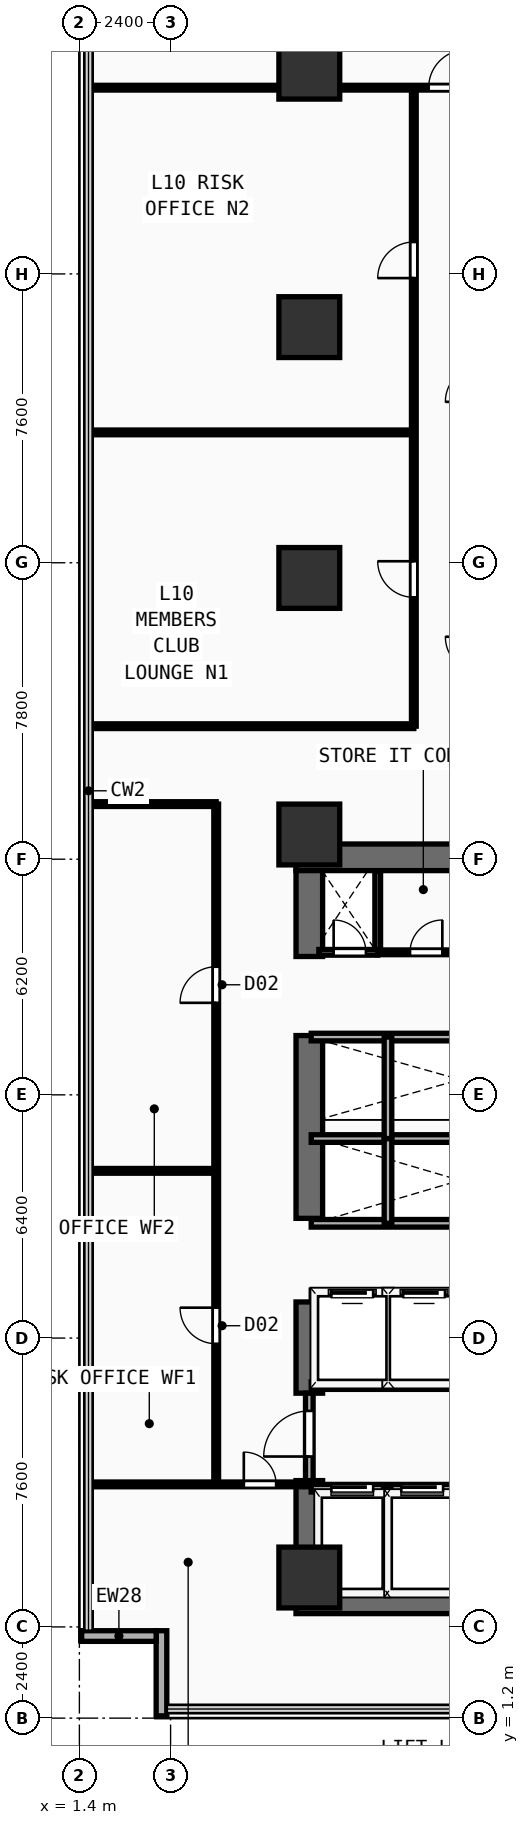
"""IFC4 building model, lengths in metres.
Left out: names, types, materials, properties, quantities, classifications, styles, units other than length and angle.
Written with IfcOpenShell. Run it as: python <this file> out.ifc"""

import sys

from ifc_helpers import new_model, si_unit, direction, frame, frame_2d, origin, origin_2d, place, context, subcontext, project, spatial, rectangle, extrude, element, fill, save


model = new_model("IFC4")
c1 = context("Model", 3, precision=1e-05, world=origin(), true_north=direction((0.0, 1.0)))
c2 = subcontext(c1, "Body", "Model", "MODEL_VIEW")
j1 = project(units=[si_unit("LENGTHUNIT", "METRE"), si_unit("PLANEANGLEUNIT", "RADIAN")], contexts=[c1])
p1 = place(None, origin())
s1 = spatial("IfcSite", under=j1, at=p1, CompositionType="ELEMENT")
p2 = place(p1, origin())
s2 = spatial("IfcBuilding", under=s1, at=p2, CompositionType="ELEMENT")
p3 = place(p2, frame((0.0, 0.0, 41.0)))
s3 = spatial("IfcBuildingStorey", under=s2, at=p3, CompositionType="ELEMENT", Elevation=41.0)
for number, where, z_axis, x_axis in (
    (1, (7.1, 4.3, 0.0), (0.0, 0.0, 1.0), (1.0, 0.0, 0.0)),
    (2, (7.1, 23.85, 0.0), (0.0, 0.0, 1.0), (1.0, 0.0, 0.0)),
):
    element("IfcWall", number, at=place(p3, frame(where, z_axis=z_axis, x_axis=x_axis)), inside=s3, PredefinedType="SHEAR", context=c2, shape_type="SweptSolid", body=[
        extrude(rectangle(XDim=14.05, YDim=0.7, at=frame_2d((7.025, 0.0))), origin(), (0.0, 0.0, 1.0), 3.54),
    ])
p4 = place(p3, frame((7.45, 4.65, 0.0), z_axis=(0.0, 0.0, 1.0), x_axis=(0.0, 1.0, 0.0)))
e3 = element("IfcWall", 3, at=p4, inside=s3, PredefinedType="SHEAR", context=c2, shape_type="SweptSolid", body=[
    extrude(rectangle(XDim=2.8, YDim=0.7, at=frame_2d((1.4, 0.0))), origin(), (0.0, 0.0, 1.0), 3.54),
])
p5 = place(p3, frame((7.45, 9.75, 0.0), z_axis=(0.0, 0.0, 1.0), x_axis=(0.0, 1.0, 0.0)))
e4 = element("IfcWall", 4, at=p5, inside=s3, PredefinedType="SHEAR", context=c2, shape_type="SweptSolid", body=[
    extrude(rectangle(XDim=2.4, YDim=0.7, at=frame_2d((1.2, 0.0))), origin(), (0.0, 0.0, 1.0), 3.54),
])
p6 = place(p3, frame((7.45, 14.35, 0.0), z_axis=(0.0, 0.0, 1.0), x_axis=(0.0, 1.0, 0.0)))
e5 = element("IfcWall", 5, at=p6, inside=s3, PredefinedType="SHEAR", context=c2, shape_type="SweptSolid", body=[
    extrude(rectangle(XDim=4.81, YDim=0.7, at=frame_2d((2.405, 0.0))), origin(), (0.0, 0.0, 1.0), 3.54),
])
p7 = place(p3, frame((7.45, 21.24, 0.0), z_axis=(0.0, 0.0, 1.0), x_axis=(0.0, 1.0, 0.0)))
e6 = element("IfcWall", 6, at=p7, inside=s3, PredefinedType="SHEAR", context=c2, shape_type="SweptSolid", body=[
    extrude(rectangle(XDim=2.26, YDim=0.7, at=frame_2d((1.13, 0.0))), origin(), (0.0, 0.0, 1.0), 3.54),
])
for number, where, z_axis, x_axis in (
    (7, (7.45, 4.9, 0.0), (0.0, 0.0, 1.0), (1.0, 0.0, 0.0)),
    (8, (7.45, 24.45, 0.0), (0.0, 0.0, 1.0), (1.0, 0.0, 0.0)),
    (9, (7.45, 31.2, 0.0), (0.0, 0.0, 1.0), (1.0, 0.0, 0.0)),
    (10, (7.45, 37.8, 0.0), (0.0, 0.0, 1.0), (1.0, 0.0, 0.0)),
    (11, (7.45, 44.6, 0.0), (0.0, 0.0, 1.0), (1.0, 0.0, 0.0)),
):
    element("IfcColumn", number, at=place(p3, frame(where, z_axis=z_axis, x_axis=x_axis)), inside=s3, PredefinedType="COLUMN", context=c2, shape_type="SweptSolid", body=[
        extrude(rectangle(XDim=1.6, YDim=1.6, at=origin_2d()), origin(), (0.0, 0.0, 1.0), 3.54),
    ])
p8 = place(p3, frame((3.56, 1.26, 0.0), z_axis=(0.0, 0.0, 1.0), x_axis=(0.0, 1.0, 0.0)))
e12 = element("IfcWall", 12, at=p8, inside=s3, PredefinedType="SOLIDWALL", context=c2, shape_type="SweptSolid", body=[
    extrude(rectangle(XDim=2.24, YDim=0.28, at=frame_2d((1.12, 0.0))), origin(), (0.0, 0.0, 1.0), 3.54),
])
p9 = place(p3, frame((1.46, 3.36, 0.0), z_axis=(0.0, 0.0, 1.0), x_axis=(1.0, 0.0, 0.0)))
e13 = element("IfcWall", 13, at=p9, inside=s3, PredefinedType="SOLIDWALL", context=c2, shape_type="SweptSolid", body=[
    extrude(rectangle(XDim=1.96, YDim=0.28, at=frame_2d((0.98, 0.0))), origin(), (0.0, 0.0, 1.0), 3.54),
])
p10 = place(p3, frame((7.5, 7.25, 0.0), z_axis=(0.0, 0.0, 1.0), x_axis=(1.0, 0.0, 0.0)))
e14 = element("IfcWall", 14, at=p10, inside=s3, PredefinedType="PARTITIONING", context=c2, shape_type="SweptSolid", body=[
    extrude(rectangle(XDim=8.35, YDim=0.2, at=frame_2d((4.175, 0.0))), origin(), (0.0, 0.0, 1.0), 3.54),
])
p11 = place(p10, frame((0.53, 0.0, 0.0)))
e15 = element("IfcOpeningElement", 15, at=p11, cuts=e14, PredefinedType="OPENING", context=c2, shape_type="SweptSolid", body=[
    extrude(rectangle(XDim=1.1, YDim=2.2, at=frame_2d((0.55, 1.1))), frame((0.0, 0.11, 0.0), z_axis=(0.0, -1.0, 0.0), x_axis=(1.0, 0.0, 0.0)), (0.0, 0.0, 1.0), 0.22),
])
p12 = place(p10, frame((2.37, 0.0, 0.0)))
e16 = element("IfcOpeningElement", 16, at=p12, cuts=e14, PredefinedType="OPENING", context=c2, shape_type="SweptSolid", body=[
    extrude(rectangle(XDim=1.1, YDim=2.2, at=frame_2d((0.55, 1.1))), frame((0.0, 0.11, 0.0), z_axis=(0.0, -1.0, 0.0), x_axis=(1.0, 0.0, 0.0)), (0.0, 0.0, 1.0), 0.22),
])
p13 = place(p10, frame((4.33, 0.0, 0.0)))
e17 = element("IfcOpeningElement", 17, at=p13, cuts=e14, PredefinedType="OPENING", context=c2, shape_type="SweptSolid", body=[
    extrude(rectangle(XDim=1.1, YDim=2.2, at=frame_2d((0.55, 1.1))), frame((0.0, 0.11, 0.0), z_axis=(0.0, -1.0, 0.0), x_axis=(1.0, 0.0, 0.0)), (0.0, 0.0, 1.0), 0.22),
])
p14 = place(p10, frame((6.5, 0.0, 0.0)))
e18 = element("IfcOpeningElement", 18, at=p14, cuts=e14, PredefinedType="OPENING", context=c2, shape_type="SweptSolid", body=[
    extrude(rectangle(XDim=1.1, YDim=2.2, at=frame_2d((0.55, 1.1))), frame((0.0, 0.11, 0.0), z_axis=(0.0, -1.0, 0.0), x_axis=(1.0, 0.0, 0.0)), (0.0, 0.0, 1.0), 0.22),
])
p15 = place(p3, frame((7.5, 9.95, 0.0), z_axis=(0.0, 0.0, 1.0), x_axis=(1.0, 0.0, 0.0)))
e19 = element("IfcWall", 19, at=p15, inside=s3, PredefinedType="PARTITIONING", context=c2, shape_type="SweptSolid", body=[
    extrude(rectangle(XDim=8.35, YDim=0.2, at=frame_2d((4.175, 0.0))), origin(), (0.0, 0.0, 1.0), 3.54),
])
p16 = place(p3, frame((9.5, 4.45, 0.0), z_axis=(0.0, 0.0, 1.0), x_axis=(0.0, 1.0, 0.0)))
e20 = element("IfcWall", 20, at=p16, inside=s3, PredefinedType="PARTITIONING", context=c2, shape_type="SweptSolid", body=[
    extrude(rectangle(XDim=2.8, YDim=0.2, at=frame_2d((1.4, 0.0))), origin(), (0.0, 0.0, 1.0), 3.54),
])
p17 = place(p3, frame((7.45, 7.45, 0.0), z_axis=(0.0, 0.0, 1.0), x_axis=(0.0, 1.0, 0.0)))
e21 = element("IfcWall", 21, at=p17, inside=s3, PredefinedType="PARTITIONING", context=c2, shape_type="SweptSolid", body=[
    extrude(rectangle(XDim=2.3, YDim=0.2, at=frame_2d((1.15, 0.0))), origin(), (0.0, 0.0, 1.0), 2.52),
])
p18 = place(p17, frame((0.633, 0.0, 0.0)))
e22 = element("IfcOpeningElement", 22, at=p18, cuts=e21, PredefinedType="OPENING", context=c2, shape_type="SweptSolid", body=[
    extrude(rectangle(XDim=1.2, YDim=2.25, at=frame_2d((0.6, 1.125))), frame((0.0, 0.11, 0.0), z_axis=(0.0, -1.0, 0.0), x_axis=(1.0, 0.0, 0.0)), (0.0, 0.0, 1.0), 0.22),
])
p19 = place(p3, frame((7.5, 12.36, 0.0), z_axis=(0.0, 0.0, 1.0), x_axis=(1.0, 0.0, 0.0)))
e23 = element("IfcWall", 23, at=p19, inside=s3, PredefinedType="PARTITIONING", context=c2, shape_type="SweptSolid", body=[
    extrude(rectangle(XDim=7.85, YDim=0.2, at=frame_2d((3.925, 0.0))), origin(), (0.0, 0.0, 1.0), 3.54),
])
p20 = place(p19, frame((0.53, 0.0, 0.0)))
e24 = element("IfcOpeningElement", 24, at=p20, cuts=e23, PredefinedType="OPENING", context=c2, shape_type="SweptSolid", body=[
    extrude(rectangle(XDim=1.1, YDim=2.2, at=frame_2d((0.55, 1.1))), frame((0.0, 0.11, 0.0), z_axis=(0.0, -1.0, 0.0), x_axis=(1.0, 0.0, 0.0)), (0.0, 0.0, 1.0), 0.22),
])
p21 = place(p19, frame((2.42, 0.0, 0.0)))
e25 = element("IfcOpeningElement", 25, at=p21, cuts=e23, PredefinedType="OPENING", context=c2, shape_type="SweptSolid", body=[
    extrude(rectangle(XDim=1.1, YDim=2.2, at=frame_2d((0.55, 1.1))), frame((0.0, 0.11, 0.0), z_axis=(0.0, -1.0, 0.0), x_axis=(1.0, 0.0, 0.0)), (0.0, 0.0, 1.0), 0.22),
])
p22 = place(p19, frame((4.31, 0.0, 0.0)))
e26 = element("IfcOpeningElement", 26, at=p22, cuts=e23, PredefinedType="OPENING", context=c2, shape_type="SweptSolid", body=[
    extrude(rectangle(XDim=1.1, YDim=2.2, at=frame_2d((0.55, 1.1))), frame((0.0, 0.11, 0.0), z_axis=(0.0, -1.0, 0.0), x_axis=(1.0, 0.0, 0.0)), (0.0, 0.0, 1.0), 0.22),
])
p23 = place(p19, frame((6.2, 0.0, 0.0)))
e27 = element("IfcOpeningElement", 27, at=p23, cuts=e23, PredefinedType="OPENING", context=c2, shape_type="SweptSolid", body=[
    extrude(rectangle(XDim=1.1, YDim=2.2, at=frame_2d((0.55, 1.1))), frame((0.0, 0.11, 0.0), z_axis=(0.0, -1.0, 0.0), x_axis=(1.0, 0.0, 0.0)), (0.0, 0.0, 1.0), 0.22),
])
p24 = place(p3, frame((9.52, 9.95, 0.0), z_axis=(0.0, 0.0, 1.0), x_axis=(0.0, 1.0, 0.0)))
e28 = element("IfcWall", 28, at=p24, inside=s3, PredefinedType="PARTITIONING", context=c2, shape_type="SweptSolid", body=[
    extrude(rectangle(XDim=2.41, YDim=0.2, at=frame_2d((1.205, 0.0))), origin(), (0.0, 0.0, 1.0), 3.54),
])
for number, where, z_axis, x_axis in (
    (29, (7.5, 14.22, 0.0), (0.0, 0.0, 1.0), (1.0, 0.0, 0.0)),
    (30, (7.5, 16.45, 0.0), (0.0, 0.0, 1.0), (1.0, 0.0, 0.0)),
):
    element("IfcWall", number, at=place(p3, frame(where, z_axis=z_axis, x_axis=x_axis)), inside=s3, PredefinedType="PARTITIONING", context=c2, shape_type="SweptSolid", body=[
        extrude(rectangle(XDim=7.85, YDim=0.2, at=frame_2d((3.925, 0.0))), origin(), (0.0, 0.0, 1.0), 3.54),
    ])
p25 = place(p3, frame((9.52, 14.22, 0.0), z_axis=(0.0, 0.0, 1.0), x_axis=(0.0, 1.0, 0.0)))
e31 = element("IfcWall", 31, at=p25, inside=s3, PredefinedType="PARTITIONING", context=c2, shape_type="SweptSolid", body=[
    extrude(rectangle(XDim=2.23, YDim=0.2, at=frame_2d((1.115, 0.0))), origin(), (0.0, 0.0, 1.0), 3.54),
])
p26 = place(p3, frame((7.5, 19.12, 0.0), z_axis=(0.0, 0.0, 1.0), x_axis=(1.0, 0.0, 0.0)))
e32 = element("IfcWall", 32, at=p26, inside=s3, PredefinedType="PARTITIONING", context=c2, shape_type="SweptSolid", body=[
    extrude(rectangle(XDim=7.85, YDim=0.2, at=frame_2d((3.925, 0.0))), origin(), (0.0, 0.0, 1.0), 3.54),
])
p27 = place(p3, frame((9.52, 16.45, 0.0), z_axis=(0.0, 0.0, 1.0), x_axis=(0.0, 1.0, 0.0)))
e33 = element("IfcWall", 33, at=p27, inside=s3, PredefinedType="PARTITIONING", context=c2, shape_type="SweptSolid", body=[
    extrude(rectangle(XDim=2.67, YDim=0.2, at=frame_2d((1.335, 0.0))), origin(), (0.0, 0.0, 1.0), 3.54),
])
p28 = place(p3, frame((9.25, 21.35, 0.0), z_axis=(0.0, 0.0, 1.0), x_axis=(0.0, 1.0, 0.0)))
e34 = element("IfcWall", 34, at=p28, inside=s3, PredefinedType="PARTITIONING", context=c2, shape_type="SweptSolid", body=[
    extrude(rectangle(XDim=2.13, YDim=0.15, at=frame_2d((1.065, 0.0))), origin(), (0.0, 0.0, 1.0), 3.54),
])
p29 = place(p3, frame((7.7, 21.35, 0.0), z_axis=(0.0, 0.0, 1.0), x_axis=(1.0, 0.0, 0.0)))
e35 = element("IfcWall", 35, at=p29, inside=s3, PredefinedType="PARTITIONING", context=c2, shape_type="SweptSolid", body=[
    extrude(rectangle(XDim=1.55, YDim=0.15, at=frame_2d((0.775, 0.0))), origin(), (0.0, 0.0, 1.0), 3.54),
])
p30 = place(p29, frame((0.39, 0.0, 0.0)))
e36 = element("IfcOpeningElement", 36, at=p30, cuts=e35, PredefinedType="OPENING", context=c2, shape_type="SweptSolid", body=[
    extrude(rectangle(XDim=0.85, YDim=2.15, at=frame_2d((0.425, 1.075))), frame((0.0, 0.085, 0.0), z_axis=(0.0, -1.0, 0.0), x_axis=(1.0, 0.0, 0.0)), (0.0, 0.0, 1.0), 0.17),
])
p31 = place(p3, frame((9.25, 21.35, 0.0), z_axis=(0.0, 0.0, 1.0), x_axis=(1.0, 0.0, 0.0)))
e37 = element("IfcWall", 37, at=p31, inside=s3, PredefinedType="PARTITIONING", context=c2, shape_type="SweptSolid", body=[
    extrude(rectangle(XDim=4.65, YDim=0.125, at=frame_2d((2.325, 0.0))), origin(), (0.0, 0.0, 1.0), 3.54),
])
p32 = place(p31, frame((0.85, 0.0, 0.0)))
e38 = element("IfcOpeningElement", 38, at=p32, cuts=e37, PredefinedType="OPENING", context=c2, shape_type="SweptSolid", body=[
    extrude(rectangle(XDim=0.85, YDim=2.15, at=frame_2d((0.425, 1.075))), frame((0.0, 0.073, 0.0), z_axis=(0.0, -1.0, 0.0), x_axis=(1.0, 0.0, 0.0)), (0.0, 0.0, 1.0), 0.145),
])
p33 = place(p31, frame((3.1, 0.0, 0.0)))
e39 = element("IfcOpeningElement", 39, at=p33, cuts=e37, PredefinedType="OPENING", context=c2, shape_type="SweptSolid", body=[
    extrude(rectangle(XDim=0.85, YDim=2.15, at=frame_2d((0.425, 1.075))), frame((0.0, 0.073, 0.0), z_axis=(0.0, -1.0, 0.0), x_axis=(1.0, 0.0, 0.0)), (0.0, 0.0, 1.0), 0.145),
])
p34 = place(p3, frame((1.64, 7.35, 0.0), z_axis=(0.0, 0.0, 1.0), x_axis=(1.0, 0.0, 0.0)))
e40 = element("IfcWall", 40, at=p34, inside=s3, PredefinedType="PARTITIONING", context=c2, shape_type="SweptSolid", body=[
    extrude(rectangle(XDim=5.76, YDim=0.125, at=frame_2d((2.88, 0.0))), origin(), (0.0, 0.0, 1.0), 3.54),
])
p35 = place(p34, frame((4.087, 0.0, 0.0)))
e41 = element("IfcOpeningElement", 41, at=p35, cuts=e40, PredefinedType="OPENING", context=c2, shape_type="SweptSolid", body=[
    extrude(rectangle(XDim=0.85, YDim=2.15, at=frame_2d((0.425, 1.075))), frame((0.0, 0.073, 0.0), z_axis=(0.0, -1.0, 0.0), x_axis=(1.0, 0.0, 0.0)), (0.0, 0.0, 1.0), 0.145),
])
p36 = place(p3, frame((5.0, 7.5, 0.0), z_axis=(0.0, 0.0, 1.0), x_axis=(0.0, 1.0, 0.0)))
e42 = element("IfcWall", 42, at=p36, inside=s3, PredefinedType="PARTITIONING", context=c2, shape_type="SweptSolid", body=[
    extrude(rectangle(XDim=17.75, YDim=0.125, at=frame_2d((8.875, 0.0))), origin(), (0.0, 0.0, 1.0), 3.54),
])
p37 = place(p36, frame((3.55, 0.0, 0.0)))
e43 = element("IfcOpeningElement", 43, at=p37, cuts=e42, PredefinedType="OPENING", context=c2, shape_type="SweptSolid", body=[
    extrude(rectangle(XDim=0.95, YDim=2.15, at=frame_2d((0.475, 1.075))), frame((0.0, 0.073, 0.0), z_axis=(0.0, -1.0, 0.0), x_axis=(1.0, 0.0, 0.0)), (0.0, 0.0, 1.0), 0.145),
])
p38 = place(p36, frame((12.521, 0.0, 0.0)))
e44 = element("IfcOpeningElement", 44, at=p38, cuts=e42, PredefinedType="OPENING", context=c2, shape_type="SweptSolid", body=[
    extrude(rectangle(XDim=0.95, YDim=2.15, at=frame_2d((0.475, 1.075))), frame((0.0, 0.073, 0.0), z_axis=(0.0, -1.0, 0.0), x_axis=(1.0, 0.0, 0.0)), (0.0, 0.0, 1.0), 0.145),
])
for number, where, z_axis, x_axis in (
    (45, (1.64, 25.25, 0.0), (0.0, 0.0, 1.0), (1.0, 0.0, 0.0)),
    (46, (1.64, 15.6, 0.0), (0.0, 0.0, 1.0), (1.0, 0.0, 0.0)),
):
    element("IfcWall", number, at=place(p3, frame(where, z_axis=z_axis, x_axis=x_axis)), inside=s3, PredefinedType="PARTITIONING", context=c2, shape_type="SweptSolid", body=[
        extrude(rectangle(XDim=3.36, YDim=0.125, at=frame_2d((1.68, 0.0))), origin(), (0.0, 0.0, 1.0), 3.54),
    ])
p39 = place(p3, frame((1.64, 27.3, 0.0), z_axis=(0.0, 0.0, 1.0), x_axis=(1.0, 0.0, 0.0)))
e47 = element("IfcWall", 47, at=p39, inside=s3, PredefinedType="PARTITIONING", context=c2, shape_type="SweptSolid", body=[
    extrude(rectangle(XDim=8.56, YDim=0.125, at=frame_2d((4.28, 0.0))), origin(), (0.0, 0.0, 1.0), 3.54),
])
p40 = place(p3, frame((10.2, 27.3, 0.0), z_axis=(0.0, 0.0, 1.0), x_axis=(0.0, 1.0, 0.0)))
e48 = element("IfcWall", 48, at=p40, inside=s3, PredefinedType="PARTITIONING", context=c2, shape_type="SweptSolid", body=[
    extrude(rectangle(XDim=16.8, YDim=0.125, at=frame_2d((8.4, 0.0))), origin(), (0.0, 0.0, 1.0), 3.54),
])
p41 = place(p40, frame((3.39, 0.0, 0.0)))
e49 = element("IfcOpeningElement", 49, at=p41, cuts=e48, PredefinedType="OPENING", context=c2, shape_type="SweptSolid", body=[
    extrude(rectangle(XDim=0.95, YDim=2.15, at=frame_2d((0.475, 1.075))), frame((0.0, 0.073, 0.0), z_axis=(0.0, -1.0, 0.0), x_axis=(1.0, 0.0, 0.0)), (0.0, 0.0, 1.0), 0.145),
])
p42 = place(p40, frame((11.79, 0.0, 0.0)))
e50 = element("IfcOpeningElement", 50, at=p42, cuts=e48, PredefinedType="OPENING", context=c2, shape_type="SweptSolid", body=[
    extrude(rectangle(XDim=0.95, YDim=2.15, at=frame_2d((0.475, 1.075))), frame((0.0, 0.073, 0.0), z_axis=(0.0, -1.0, 0.0), x_axis=(1.0, 0.0, 0.0)), (0.0, 0.0, 1.0), 0.145),
])
p43 = place(p3, frame((1.64, 35.03, 0.0), z_axis=(0.0, 0.0, 1.0), x_axis=(1.0, 0.0, 0.0)))
e51 = element("IfcWall", 51, at=p43, inside=s3, PredefinedType="PARTITIONING", context=c2, shape_type="SweptSolid", body=[
    extrude(rectangle(XDim=8.56, YDim=0.125, at=frame_2d((4.28, 0.0))), origin(), (0.0, 0.0, 1.0), 3.54),
])
p44 = place(p3, frame((1.64, 44.1, 0.0), z_axis=(0.0, 0.0, 1.0), x_axis=(1.0, 0.0, 0.0)))
e52 = element("IfcWall", 52, at=p44, inside=s3, PredefinedType="PARTITIONING", context=c2, shape_type="SweptSolid", body=[
    extrude(rectangle(XDim=23.72, YDim=0.125, at=frame_2d((11.86, 0.0))), origin(), (0.0, 0.0, 1.0), 3.54),
])
p45 = place(p44, frame((8.95, 0.0, 0.0)))
e53 = element("IfcOpeningElement", 53, at=p45, cuts=e52, PredefinedType="OPENING", context=c2, shape_type="SweptSolid", body=[
    extrude(rectangle(XDim=1.0, YDim=2.2, at=frame_2d((0.5, 1.1))), frame((0.0, 0.073, 0.0), z_axis=(0.0, -1.0, 0.0), x_axis=(1.0, 0.0, 0.0)), (0.0, 0.0, 1.0), 0.145),
])
p46 = place(p11, origin())
e54 = element("IfcDoor", 54, at=p46, inside=s3, OperationType="SLIDING_TO_LEFT", PredefinedType="DOOR", context=c2, shape_type="SweptSolid", body=[
    extrude(rectangle(XDim=1.1, YDim=2.2, at=frame_2d((0.55, 1.1))), frame((0.0, 0.025, 0.0), z_axis=(0.0, -1.0, 0.0), x_axis=(1.0, 0.0, 0.0)), (0.0, 0.0, 1.0), 0.05),
])
fill(e15, e54)
p47 = place(p12, origin())
e55 = element("IfcDoor", 55, at=p47, inside=s3, OperationType="SLIDING_TO_LEFT", PredefinedType="DOOR", context=c2, shape_type="SweptSolid", body=[
    extrude(rectangle(XDim=1.1, YDim=2.2, at=frame_2d((0.55, 1.1))), frame((0.0, 0.025, 0.0), z_axis=(0.0, -1.0, 0.0), x_axis=(1.0, 0.0, 0.0)), (0.0, 0.0, 1.0), 0.05),
])
fill(e16, e55)
p48 = place(p18, frame((1.2, 0.0, 0.0), z_axis=(0.0, 0.0, 1.0), x_axis=(-1.0, 0.0, 0.0)))
e56 = element("IfcDoor", 56, at=p48, inside=s3, OperationType="SINGLE_SWING_RIGHT", PredefinedType="DOOR", context=c2, shape_type="SweptSolid", body=[
    extrude(rectangle(XDim=1.2, YDim=2.25, at=frame_2d((0.6, 1.125))), frame((0.0, 0.025, 0.0), z_axis=(0.0, -1.0, 0.0), x_axis=(1.0, 0.0, 0.0)), (0.0, 0.0, 1.0), 0.05),
])
fill(e22, e56)
p49 = place(p20, origin())
e57 = element("IfcDoor", 57, at=p49, inside=s3, OperationType="SLIDING_TO_LEFT", PredefinedType="DOOR", context=c2, shape_type="SweptSolid", body=[
    extrude(rectangle(XDim=1.1, YDim=2.2, at=frame_2d((0.55, 1.1))), frame((0.0, 0.025, 0.0), z_axis=(0.0, -1.0, 0.0), x_axis=(1.0, 0.0, 0.0)), (0.0, 0.0, 1.0), 0.05),
])
fill(e24, e57)
p50 = place(p21, origin())
e58 = element("IfcDoor", 58, at=p50, inside=s3, OperationType="SLIDING_TO_LEFT", PredefinedType="DOOR", context=c2, shape_type="SweptSolid", body=[
    extrude(rectangle(XDim=1.1, YDim=2.2, at=frame_2d((0.55, 1.1))), frame((0.0, 0.025, 0.0), z_axis=(0.0, -1.0, 0.0), x_axis=(1.0, 0.0, 0.0)), (0.0, 0.0, 1.0), 0.05),
])
fill(e25, e58)
p51 = place(p30, origin())
e59 = element("IfcDoor", 59, at=p51, inside=s3, OperationType="SINGLE_SWING_LEFT", PredefinedType="DOOR", context=c2, shape_type="SweptSolid", body=[
    extrude(rectangle(XDim=0.85, YDim=2.15, at=frame_2d((0.425, 1.075))), frame((0.0, 0.025, 0.0), z_axis=(0.0, -1.0, 0.0), x_axis=(1.0, 0.0, 0.0)), (0.0, 0.0, 1.0), 0.05),
])
fill(e36, e59)
p52 = place(p32, origin())
e60 = element("IfcDoor", 60, at=p52, inside=s3, OperationType="SINGLE_SWING_RIGHT", PredefinedType="DOOR", context=c2, shape_type="SweptSolid", body=[
    extrude(rectangle(XDim=0.85, YDim=2.15, at=frame_2d((0.425, 1.075))), frame((0.0, 0.025, 0.0), z_axis=(0.0, -1.0, 0.0), x_axis=(1.0, 0.0, 0.0)), (0.0, 0.0, 1.0), 0.05),
])
fill(e38, e60)
p53 = place(p35, origin())
e61 = element("IfcDoor", 61, at=p53, inside=s3, OperationType="SINGLE_SWING_LEFT", PredefinedType="DOOR", context=c2, shape_type="SweptSolid", body=[
    extrude(rectangle(XDim=0.85, YDim=2.15, at=frame_2d((0.425, 1.075))), frame((0.0, 0.025, 0.0), z_axis=(0.0, -1.0, 0.0), x_axis=(1.0, 0.0, 0.0)), (0.0, 0.0, 1.0), 0.05),
])
fill(e41, e61)
p54 = place(p37, origin())
e62 = element("IfcDoor", 62, at=p54, inside=s3, OperationType="SINGLE_SWING_RIGHT", PredefinedType="DOOR", context=c2, shape_type="SweptSolid", body=[
    extrude(rectangle(XDim=0.95, YDim=2.15, at=frame_2d((0.475, 1.075))), frame((0.0, 0.025, 0.0), z_axis=(0.0, -1.0, 0.0), x_axis=(1.0, 0.0, 0.0)), (0.0, 0.0, 1.0), 0.05),
])
fill(e43, e62)
p55 = place(p38, origin())
e63 = element("IfcDoor", 63, at=p55, inside=s3, OperationType="SINGLE_SWING_LEFT", PredefinedType="DOOR", context=c2, shape_type="SweptSolid", body=[
    extrude(rectangle(XDim=0.95, YDim=2.15, at=frame_2d((0.475, 1.075))), frame((0.0, 0.025, 0.0), z_axis=(0.0, -1.0, 0.0), x_axis=(1.0, 0.0, 0.0)), (0.0, 0.0, 1.0), 0.05),
])
fill(e44, e63)
p56 = place(p41, origin())
e64 = element("IfcDoor", 64, at=p56, inside=s3, OperationType="SINGLE_SWING_RIGHT", PredefinedType="DOOR", context=c2, shape_type="SweptSolid", body=[
    extrude(rectangle(XDim=0.95, YDim=2.15, at=frame_2d((0.475, 1.075))), frame((0.0, 0.025, 0.0), z_axis=(0.0, -1.0, 0.0), x_axis=(1.0, 0.0, 0.0)), (0.0, 0.0, 1.0), 0.05),
])
fill(e49, e64)
p57 = place(p42, origin())
e65 = element("IfcDoor", 65, at=p57, inside=s3, OperationType="SINGLE_SWING_LEFT", PredefinedType="DOOR", context=c2, shape_type="SweptSolid", body=[
    extrude(rectangle(XDim=0.95, YDim=2.15, at=frame_2d((0.475, 1.075))), frame((0.0, 0.025, 0.0), z_axis=(0.0, -1.0, 0.0), x_axis=(1.0, 0.0, 0.0)), (0.0, 0.0, 1.0), 0.05),
])
fill(e50, e65)
p58 = place(p45, origin())
e66 = element("IfcDoor", 66, at=p58, inside=s3, OperationType="SINGLE_SWING_RIGHT", PredefinedType="DOOR", context=c2, shape_type="SweptSolid", body=[
    extrude(rectangle(XDim=1.0, YDim=2.2, at=frame_2d((0.5, 1.1))), frame((0.0, 0.025, 0.0), z_axis=(0.0, -1.0, 0.0), x_axis=(1.0, 0.0, 0.0)), (0.0, 0.0, 1.0), 0.05),
])
fill(e53, e66)
save(model, sys.argv[1])
